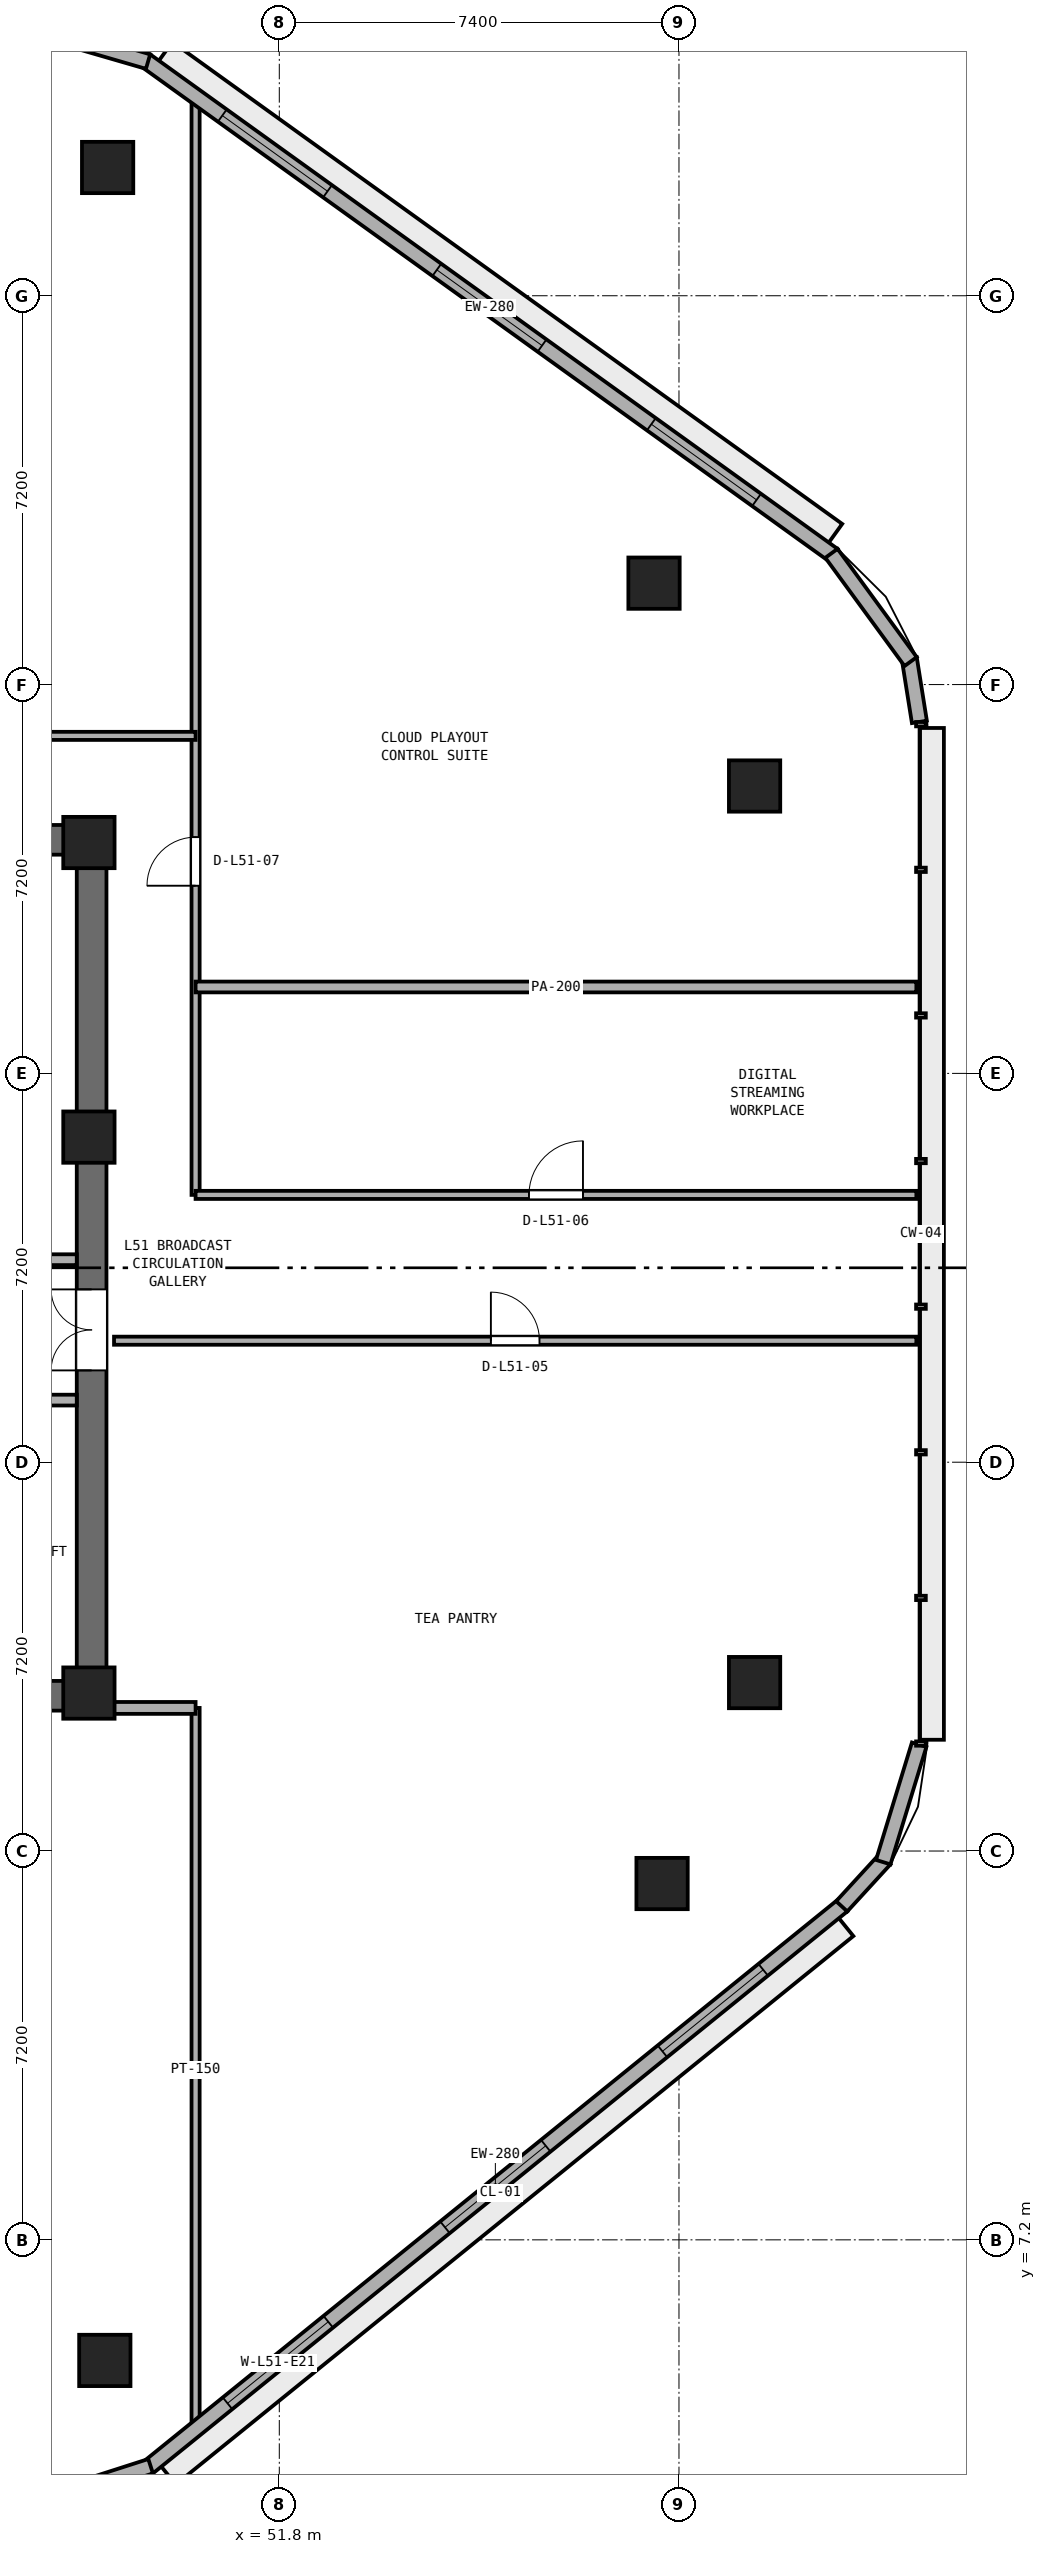
"""IFC4 building model, lengths in metres.
Left out: names, types, materials, properties, quantities, classifications, styles, units other than length and angle.
Written with IfcOpenShell. Run it as: python <this file> out.ifc"""

import sys

from ifc_helpers import new_model, si_unit, direction, frame, frame_2d, origin, origin_2d, place, context, subcontext, project, spatial, rectangle, extrude, element, fill, save


model = new_model("IFC4")
c1 = context("Model", 3, precision=1e-05, world=origin(), true_north=direction((0.0, 1.0)))
c2 = subcontext(c1, "Body", "Model", "MODEL_VIEW")
j1 = project(units=[si_unit("LENGTHUNIT", "METRE"), si_unit("PLANEANGLEUNIT", "RADIAN")], contexts=[c1])
p1 = place(None, origin())
s1 = spatial("IfcSite", under=j1, at=p1, CompositionType="ELEMENT")
p2 = place(p1, origin())
s2 = spatial("IfcBuilding", under=s1, at=p2, CompositionType="ELEMENT")
p3 = place(p2, frame((0.0, 0.0, 201.0)))
s3 = spatial("IfcBuildingStorey", under=s2, at=p3, CompositionType="ELEMENT", Elevation=201.0)
for number, where, z_axis, x_axis in (
    (1, (25.4, 17.275, 0.0), (0.0, 0.0, 1.0), (1.0, 0.0, 0.0)),
    (2, (25.4, 33.125, 0.0), (0.0, 0.0, 1.0), (1.0, 0.0, 0.0)),
):
    element("IfcWall", number, at=place(p3, frame(where, z_axis=z_axis, x_axis=x_axis)), inside=s3, PredefinedType="SHEAR", context=c2, shape_type="SweptSolid", body=[
        extrude(rectangle(XDim=23.2, YDim=0.55, at=frame_2d((11.6, 0.0))), origin(), (0.0, 0.0, 1.0), 3.54),
    ])
p4 = place(p3, frame((48.325, 17.55, 0.0), z_axis=(0.0, 0.0, 1.0), x_axis=(0.0, 1.0, 0.0)))
e3 = element("IfcWall", 3, at=p4, inside=s3, PredefinedType="SHEAR", context=c2, shape_type="SweptSolid", body=[
    extrude(rectangle(XDim=15.3, YDim=0.55, at=frame_2d((7.65, 0.0))), origin(), (0.0, 0.0, 1.0), 3.54),
])
p5 = place(p4, frame((5.75, 0.0, 0.0)))
e4 = element("IfcOpeningElement", 4, at=p5, cuts=e3, PredefinedType="OPENING", context=c2, shape_type="SweptSolid", body=[
    extrude(rectangle(XDim=1.5, YDim=2.15, at=frame_2d((0.75, 1.075))), frame((0.0, 0.285, 0.0), z_axis=(0.0, -1.0, 0.0), x_axis=(1.0, 0.0, 0.0)), (0.0, 0.0, 1.0), 0.57),
])
for number, where, z_axis, x_axis in (
    (5, (48.275, 17.325, 0.0), (0.0, 0.0, 1.0), (1.0, 0.0, 0.0)),
    (6, (48.275, 27.62, 0.0), (0.0, 0.0, 1.0), (1.0, 0.0, 0.0)),
    (7, (48.275, 33.075, 0.0), (0.0, 0.0, 1.0), (1.0, 0.0, 0.0)),
):
    element("IfcColumn", number, at=place(p3, frame(where, z_axis=z_axis, x_axis=x_axis)), inside=s3, PredefinedType="PILASTER", context=c2, shape_type="SweptSolid", body=[
        extrude(rectangle(XDim=0.95, YDim=0.95, at=origin_2d()), origin(), (0.0, 0.0, 1.0), 3.8),
    ])
for number, where, z_axis, x_axis in (
    (8, (48.57, 4.967, 0.0), (0.0, 0.0, 1.0), (1.0, 0.0, 0.0)),
    (9, (58.887, 13.798, 0.0), (0.0, 0.0, 1.0), (1.0, 0.0, 0.0)),
    (10, (60.6, 17.519, 0.0), (0.0, 0.0, 1.0), (1.0, 0.0, 0.0)),
    (11, (60.6, 34.122, 0.0), (0.0, 0.0, 1.0), (1.0, 0.0, 0.0)),
    (12, (58.738, 37.878, 0.0), (0.0, 0.0, 1.0), (1.0, 0.0, 0.0)),
    (13, (48.622, 45.575, 0.0), (0.0, 0.0, 1.0), (1.0, 0.0, 0.0)),
):
    element("IfcColumn", number, at=place(p3, frame(where, z_axis=z_axis, x_axis=x_axis)), inside=s3, PredefinedType="COLUMN", context=c2, shape_type="SweptSolid", body=[
        extrude(rectangle(XDim=0.95, YDim=0.95, at=origin_2d()), origin(), (0.0, 0.0, 1.0), 3.8),
    ])
p6 = place(p3, frame((42.0, 22.75, 0.0), z_axis=(0.0, 0.0, 1.0), x_axis=(1.0, 0.0, 0.0)))
e14 = element("IfcWall", 14, at=p6, inside=s3, PredefinedType="SOLIDWALL", context=c2, shape_type="SweptSolid", body=[
    extrude(rectangle(XDim=6.05, YDim=0.2, at=frame_2d((3.025, 0.0))), origin(), (0.0, 0.0, 1.0), 3.54),
])
p7 = place(p3, frame((46.1, 25.35, 0.0), z_axis=(0.0, 0.0, 1.0), x_axis=(1.0, 0.0, 0.0)))
e15 = element("IfcWall", 15, at=p7, inside=s3, PredefinedType="SOLIDWALL", context=c2, shape_type="SweptSolid", body=[
    extrude(rectangle(XDim=1.95, YDim=0.2, at=frame_2d((0.975, 0.0))), origin(), (0.0, 0.0, 1.0), 3.54),
])
p8 = place(p3, frame((50.25, 3.654, 0.0), z_axis=(0.0, 0.0, 1.0), x_axis=(0.0, 1.0, 0.0)))
e16 = element("IfcWall", 16, at=p8, inside=s3, PredefinedType="PARTITIONING", context=c2, shape_type="SweptSolid", body=[
    extrude(rectangle(XDim=13.396, YDim=0.15, at=frame_2d((6.698, 0.0))), origin(), (0.0, 0.0, 1.0), 3.54),
])
p9 = place(p3, frame((50.25, 26.55, 0.0), z_axis=(0.0, 0.0, 1.0), x_axis=(0.0, 1.0, 0.0)))
e17 = element("IfcWall", 17, at=p9, inside=s3, PredefinedType="PARTITIONING", context=c2, shape_type="SweptSolid", body=[
    extrude(rectangle(XDim=20.375, YDim=0.15, at=frame_2d((10.188, 0.0))), origin(), (0.0, 0.0, 1.0), 3.54),
])
p10 = place(p9, frame((5.725, 0.0, 0.0)))
e18 = element("IfcOpeningElement", 18, at=p10, cuts=e17, PredefinedType="OPENING", context=c2, shape_type="SweptSolid", body=[
    extrude(rectangle(XDim=0.9, YDim=2.1, at=frame_2d((0.45, 1.05))), frame((0.0, 0.085, 0.0), z_axis=(0.0, -1.0, 0.0), x_axis=(1.0, 0.0, 0.0)), (0.0, 0.0, 1.0), 0.17),
])
p11 = place(p3, frame((48.74, 17.05, 0.0), z_axis=(0.0, 0.0, 1.0), x_axis=(1.0, 0.0, 0.0)))
e19 = element("IfcWall", 19, at=p11, inside=s3, PredefinedType="PARTITIONING", context=c2, shape_type="SweptSolid", body=[
    extrude(rectangle(XDim=1.51, YDim=0.22, at=frame_2d((0.755, 0.0))), origin(), (0.0, 0.0, 1.0), 2.923),
])
p12 = place(p3, frame((48.74, 23.85, 0.0), z_axis=(0.0, 0.0, 1.0), x_axis=(1.0, 0.0, 0.0)))
e20 = element("IfcWall", 20, at=p12, inside=s3, PredefinedType="PARTITIONING", context=c2, shape_type="SweptSolid", body=[
    extrude(rectangle(XDim=14.855, YDim=0.15, at=frame_2d((7.427, 0.0))), origin(), (0.0, 0.0, 1.0), 3.54),
])
p13 = place(p12, frame((6.978, 0.0, 0.0)))
e21 = element("IfcOpeningElement", 21, at=p13, cuts=e20, PredefinedType="OPENING", context=c2, shape_type="SweptSolid", body=[
    extrude(rectangle(XDim=0.9, YDim=2.1, at=frame_2d((0.45, 1.05))), frame((0.0, 0.085, 0.0), z_axis=(0.0, -1.0, 0.0), x_axis=(1.0, 0.0, 0.0)), (0.0, 0.0, 1.0), 0.17),
])
p14 = place(p3, frame((50.25, 26.55, 0.0), z_axis=(0.0, 0.0, 1.0), x_axis=(1.0, 0.0, 0.0)))
e22 = element("IfcWall", 22, at=p14, inside=s3, PredefinedType="PARTITIONING", context=c2, shape_type="SweptSolid", body=[
    extrude(rectangle(XDim=13.345, YDim=0.15, at=frame_2d((6.672, 0.0))), origin(), (0.0, 0.0, 1.0), 3.54),
])
p15 = place(p14, frame((6.173, 0.0, 0.0)))
e23 = element("IfcOpeningElement", 23, at=p15, cuts=e22, PredefinedType="OPENING", context=c2, shape_type="SweptSolid", body=[
    extrude(rectangle(XDim=1.0, YDim=2.12, at=frame_2d((0.5, 1.06))), frame((0.0, 0.085, 0.0), z_axis=(0.0, -1.0, 0.0), x_axis=(1.0, 0.0, 0.0)), (0.0, 0.0, 1.0), 0.17),
])
p16 = place(p3, frame((50.25, 30.4, 0.0), z_axis=(0.0, 0.0, 1.0), x_axis=(1.0, 0.0, 0.0)))
e24 = element("IfcWall", 24, at=p16, inside=s3, PredefinedType="PARTITIONING", context=c2, shape_type="SweptSolid", body=[
    extrude(rectangle(XDim=13.345, YDim=0.2, at=frame_2d((6.672, 0.0))), origin(), (0.0, 0.0, 1.0), 3.54),
])
p17 = place(p3, frame((23.75, 35.05, 0.0), z_axis=(0.0, 0.0, 1.0), x_axis=(1.0, 0.0, 0.0)))
e25 = element("IfcWall", 25, at=p17, inside=s3, PredefinedType="PARTITIONING", context=c2, shape_type="SweptSolid", body=[
    extrude(rectangle(XDim=26.5, YDim=0.15, at=frame_2d((13.25, 0.0))), origin(), (0.0, 0.0, 1.0), 3.54),
])
p18 = place(p17, frame((12.75, 0.0, 0.0)))
e26 = element("IfcOpeningElement", 26, at=p18, cuts=e25, PredefinedType="OPENING", context=c2, shape_type="SweptSolid", body=[
    extrude(rectangle(XDim=1.0, YDim=2.12, at=frame_2d((0.5, 1.06))), frame((0.0, 0.085, 0.0), z_axis=(0.0, -1.0, 0.0), x_axis=(1.0, 0.0, 0.0)), (0.0, 0.0, 1.0), 0.17),
])
p19 = place(p3, frame((49.372, 2.984, 0.0), z_axis=(0.0, 0.0, 1.0), x_axis=(0.777278899851, 0.629156190343, 0.0)))
e27 = element("IfcWall", 27, at=p19, inside=s3, PredefinedType="STANDARD", context=c2, shape_type="SweptSolid", body=[
    extrude(rectangle(XDim=16.54, YDim=0.28, at=frame_2d((8.27, 0.0))), origin(), (0.0, 0.0, 1.0), 3.54),
])
p20 = place(p19, frame((1.89, 0.0, 0.9)))
e28 = element("IfcOpeningElement", 28, at=p20, cuts=e27, PredefinedType="OPENING", context=c2, shape_type="SweptSolid", body=[
    extrude(rectangle(XDim=2.4, YDim=1.75, at=frame_2d((1.2, 0.875))), frame((0.0, 0.15, 0.0), z_axis=(0.0, -1.0, 0.0), x_axis=(1.0, 0.0, 0.0)), (0.0, 0.0, 1.0), 0.3),
])
p21 = place(p19, frame((7.07, 0.0, 0.9)))
e29 = element("IfcOpeningElement", 29, at=p21, cuts=e27, PredefinedType="OPENING", context=c2, shape_type="SweptSolid", body=[
    extrude(rectangle(XDim=2.4, YDim=1.75, at=frame_2d((1.2, 0.875))), frame((0.0, 0.15, 0.0), z_axis=(0.0, -1.0, 0.0), x_axis=(1.0, 0.0, 0.0)), (0.0, 0.0, 1.0), 0.3),
])
p22 = place(p19, frame((12.25, 0.0, 0.9)))
e30 = element("IfcOpeningElement", 30, at=p22, cuts=e27, PredefinedType="OPENING", context=c2, shape_type="SweptSolid", body=[
    extrude(rectangle(XDim=2.4, YDim=1.75, at=frame_2d((1.2, 0.875))), frame((0.0, 0.15, 0.0), z_axis=(0.0, -1.0, 0.0), x_axis=(1.0, 0.0, 0.0)), (0.0, 0.0, 1.0), 0.3),
])
p23 = place(p3, frame((62.054, 38.399, 0.0), z_axis=(0.0, 0.0, 1.0), x_axis=(-0.81172124793, 0.584045045915, 0.0)))
e31 = element("IfcWall", 31, at=p23, inside=s3, PredefinedType="STANDARD", context=c2, shape_type="SweptSolid", body=[
    extrude(rectangle(XDim=15.679, YDim=0.28, at=frame_2d((7.84, 0.0))), origin(), (0.0, 0.0, 1.0), 3.54),
])
p24 = place(p23, frame((1.747, 0.0, 0.9)))
e32 = element("IfcOpeningElement", 32, at=p24, cuts=e31, PredefinedType="OPENING", context=c2, shape_type="SweptSolid", body=[
    extrude(rectangle(XDim=2.4, YDim=1.75, at=frame_2d((1.2, 0.875))), frame((0.0, 0.15, 0.0), z_axis=(0.0, -1.0, 0.0), x_axis=(1.0, 0.0, 0.0)), (0.0, 0.0, 1.0), 0.3),
])
p25 = place(p23, frame((6.64, 0.0, 0.9)))
e33 = element("IfcOpeningElement", 33, at=p25, cuts=e31, PredefinedType="OPENING", context=c2, shape_type="SweptSolid", body=[
    extrude(rectangle(XDim=2.4, YDim=1.75, at=frame_2d((1.2, 0.875))), frame((0.0, 0.15, 0.0), z_axis=(0.0, -1.0, 0.0), x_axis=(1.0, 0.0, 0.0)), (0.0, 0.0, 1.0), 0.3),
])
p26 = place(p23, frame((11.533, 0.0, 0.9)))
e34 = element("IfcOpeningElement", 34, at=p26, cuts=e31, PredefinedType="OPENING", context=c2, shape_type="SweptSolid", body=[
    extrude(rectangle(XDim=2.4, YDim=1.75, at=frame_2d((1.2, 0.875))), frame((0.0, 0.15, 0.0), z_axis=(0.0, -1.0, 0.0), x_axis=(1.0, 0.0, 0.0)), (0.0, 0.0, 1.0), 0.3),
])
p27 = place(p3, frame((46.666, 2.124, 0.0), z_axis=(0.0, 0.0, 1.0), x_axis=(0.952065470694, 0.305894327363, 0.0)))
e35 = element("IfcWall", 35, at=p27, inside=s3, PredefinedType="STANDARD", context=c2, shape_type="SweptSolid", body=[
    extrude(rectangle(XDim=2.89, YDim=0.28, at=frame_2d((1.445, 0.0))), origin(), (0.0, 0.0, 1.0), 3.54),
])
p28 = place(p3, frame((62.213, 13.376, 0.0), z_axis=(0.0, 0.0, 1.0), x_axis=(0.675790054291, 0.737094161232, 0.0)))
e36 = element("IfcWall", 36, at=p28, inside=s3, PredefinedType="STANDARD", context=c2, shape_type="SweptSolid", body=[
    extrude(rectangle(XDim=1.183, YDim=0.28, at=frame_2d((0.591, 0.0))), origin(), (0.0, 0.0, 1.0), 3.54),
])
p29 = place(p3, frame((62.982, 14.194, 0.0), z_axis=(0.0, 0.0, 1.0), x_axis=(0.292493949144, 0.956267373549, 0.0)))
e37 = element("IfcWall", 37, at=p29, inside=s3, PredefinedType="STANDARD", context=c2, shape_type="SweptSolid", body=[
    extrude(rectangle(XDim=2.274, YDim=0.28, at=frame_2d((1.137, 0.0))), origin(), (0.0, 0.0, 1.0), 3.54),
])
p30 = place(p3, frame((63.652, 35.308, 0.0), z_axis=(0.0, 0.0, 1.0), x_axis=(-0.157223956062, 0.987562974012, 0.0)))
e38 = element("IfcWall", 38, at=p30, inside=s3, PredefinedType="STANDARD", context=c2, shape_type="SweptSolid", body=[
    extrude(rectangle(XDim=1.193, YDim=0.28, at=frame_2d((0.596, 0.0))), origin(), (0.0, 0.0, 1.0), 3.54),
])
p31 = place(p3, frame((63.489, 36.426, 0.0), z_axis=(0.0, 0.0, 1.0), x_axis=(-0.590267940876, 0.80720738226, 0.0)))
e39 = element("IfcWall", 39, at=p31, inside=s3, PredefinedType="STANDARD", context=c2, shape_type="SweptSolid", body=[
    extrude(rectangle(XDim=2.484, YDim=0.28, at=frame_2d((1.242, 0.0))), origin(), (0.0, 0.0, 1.0), 3.54),
])
p32 = place(p3, frame((49.37, 47.536, 0.0), z_axis=(0.0, 0.0, 1.0), x_axis=(-0.960380089791, 0.278693529048, 0.0)))
e40 = element("IfcWall", 40, at=p32, inside=s3, PredefinedType="STANDARD", context=c2, shape_type="SweptSolid", body=[
    extrude(rectangle(XDim=2.677, YDim=0.28, at=frame_2d((1.338, 0.0))), origin(), (0.0, 0.0, 1.0), 3.54),
])
p33 = place(p5, origin())
e41 = element("IfcDoor", 41, at=p33, inside=s3, OperationType="DOUBLE_DOOR_SINGLE_SWING", PredefinedType="DOOR", context=c2, shape_type="SweptSolid", body=[
    extrude(rectangle(XDim=1.5, YDim=2.15, at=frame_2d((0.75, 1.075))), frame((0.0, 0.025, 0.0), z_axis=(0.0, -1.0, 0.0), x_axis=(1.0, 0.0, 0.0)), (0.0, 0.0, 1.0), 0.05),
])
fill(e4, e41)
p34 = place(p13, origin())
e42 = element("IfcDoor", 42, at=p34, inside=s3, OperationType="SINGLE_SWING_LEFT", PredefinedType="DOOR", context=c2, shape_type="SweptSolid", body=[
    extrude(rectangle(XDim=0.9, YDim=2.1, at=frame_2d((0.45, 1.05))), frame((0.0, 0.025, 0.0), z_axis=(0.0, -1.0, 0.0), x_axis=(1.0, 0.0, 0.0)), (0.0, 0.0, 1.0), 0.05),
])
fill(e21, e42)
p35 = place(p15, origin())
e43 = element("IfcDoor", 43, at=p35, inside=s3, OperationType="SINGLE_SWING_RIGHT", PredefinedType="DOOR", context=c2, shape_type="SweptSolid", body=[
    extrude(rectangle(XDim=1.0, YDim=2.12, at=frame_2d((0.5, 1.06))), frame((0.0, 0.025, 0.0), z_axis=(0.0, -1.0, 0.0), x_axis=(1.0, 0.0, 0.0)), (0.0, 0.0, 1.0), 0.05),
])
fill(e23, e43)
p36 = place(p10, origin())
e44 = element("IfcDoor", 44, at=p36, inside=s3, OperationType="SINGLE_SWING_LEFT", PredefinedType="DOOR", context=c2, shape_type="SweptSolid", body=[
    extrude(rectangle(XDim=0.9, YDim=2.1, at=frame_2d((0.45, 1.05))), frame((0.0, 0.025, 0.0), z_axis=(0.0, -1.0, 0.0), x_axis=(1.0, 0.0, 0.0)), (0.0, 0.0, 1.0), 0.05),
])
fill(e18, e44)
p37 = place(p20, origin())
e45 = element("IfcWindow", 45, at=p37, inside=s3, PartitioningType="SINGLE_PANEL", PredefinedType="WINDOW", context=c2, shape_type="SweptSolid", body=[
    extrude(rectangle(XDim=2.4, YDim=1.75, at=frame_2d((1.2, 0.875))), frame((0.0, 0.03, 0.0), z_axis=(0.0, -1.0, 0.0), x_axis=(1.0, 0.0, 0.0)), (0.0, 0.0, 1.0), 0.06),
])
fill(e28, e45)
p38 = place(p21, origin())
e46 = element("IfcWindow", 46, at=p38, inside=s3, PartitioningType="SINGLE_PANEL", PredefinedType="WINDOW", context=c2, shape_type="SweptSolid", body=[
    extrude(rectangle(XDim=2.4, YDim=1.75, at=frame_2d((1.2, 0.875))), frame((0.0, 0.03, 0.0), z_axis=(0.0, -1.0, 0.0), x_axis=(1.0, 0.0, 0.0)), (0.0, 0.0, 1.0), 0.06),
])
fill(e29, e46)
p39 = place(p22, origin())
e47 = element("IfcWindow", 47, at=p39, inside=s3, PartitioningType="SINGLE_PANEL", PredefinedType="WINDOW", context=c2, shape_type="SweptSolid", body=[
    extrude(rectangle(XDim=2.4, YDim=1.75, at=frame_2d((1.2, 0.875))), frame((0.0, 0.03, 0.0), z_axis=(0.0, -1.0, 0.0), x_axis=(1.0, 0.0, 0.0)), (0.0, 0.0, 1.0), 0.06),
])
fill(e30, e47)
p40 = place(p24, origin())
e48 = element("IfcWindow", 48, at=p40, inside=s3, PartitioningType="SINGLE_PANEL", PredefinedType="WINDOW", context=c2, shape_type="SweptSolid", body=[
    extrude(rectangle(XDim=2.4, YDim=1.75, at=frame_2d((1.2, 0.875))), frame((0.0, 0.03, 0.0), z_axis=(0.0, -1.0, 0.0), x_axis=(1.0, 0.0, 0.0)), (0.0, 0.0, 1.0), 0.06),
])
fill(e32, e48)
p41 = place(p25, origin())
e49 = element("IfcWindow", 49, at=p41, inside=s3, PartitioningType="SINGLE_PANEL", PredefinedType="WINDOW", context=c2, shape_type="SweptSolid", body=[
    extrude(rectangle(XDim=2.4, YDim=1.75, at=frame_2d((1.2, 0.875))), frame((0.0, 0.03, 0.0), z_axis=(0.0, -1.0, 0.0), x_axis=(1.0, 0.0, 0.0)), (0.0, 0.0, 1.0), 0.06),
])
fill(e33, e49)
p42 = place(p26, origin())
e50 = element("IfcWindow", 50, at=p42, inside=s3, PartitioningType="SINGLE_PANEL", PredefinedType="WINDOW", context=c2, shape_type="SweptSolid", body=[
    extrude(rectangle(XDim=2.4, YDim=1.75, at=frame_2d((1.2, 0.875))), frame((0.0, 0.03, 0.0), z_axis=(0.0, -1.0, 0.0), x_axis=(1.0, 0.0, 0.0)), (0.0, 0.0, 1.0), 0.06),
])
fill(e34, e50)
save(model, sys.argv[1])
